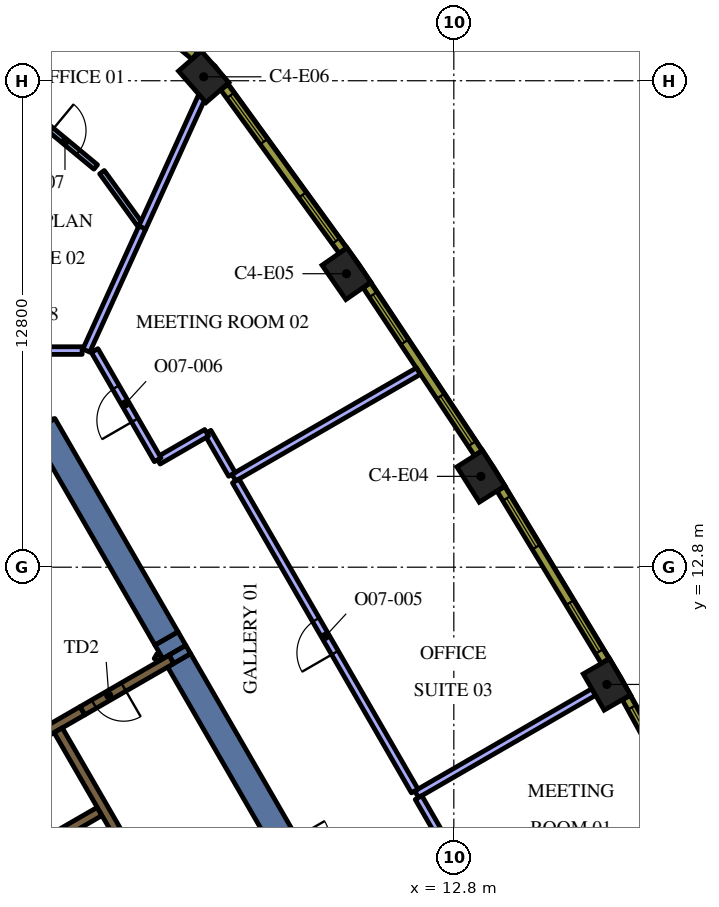
"""IFC4 building model, lengths in metres.
Left out: names, types, materials, properties, quantities, classifications, styles, units other than length and angle.
Written with IfcOpenShell. Run it as: python <this file> out.ifc"""

import sys

from ifc_helpers import new_model, si_unit, direction, frame, frame_2d, origin, origin_2d, place, context, subcontext, project, spatial, polyline, rectangle, outline, extrude, element, fill, save


model = new_model("IFC4")
c1 = context("Model", 3, precision=1e-05, world=origin(), true_north=direction((0.0, 1.0)))
c2 = subcontext(c1, "Body", "Model", "MODEL_VIEW")
j1 = project(units=[si_unit("LENGTHUNIT", "METRE"), si_unit("PLANEANGLEUNIT", "RADIAN")], contexts=[c1])
p1 = place(None, origin())
s1 = spatial("IfcSite", under=j1, at=p1, CompositionType="ELEMENT")
p2 = place(p1, origin())
s2 = spatial("IfcBuilding", under=s1, at=p2, CompositionType="ELEMENT")
p3 = place(p2, frame((0.0, 0.0, 222.6)))
s3 = spatial("IfcBuildingStorey", under=s2, at=p3, CompositionType="ELEMENT", Elevation=222.6)
for number, where, z_axis, x_axis in (
    (1, (16.827, 9.715, 0.0), (0.0, 0.0, 1.0), (-0.5, 0.866, 0.0)),
    (2, (13.513, 15.19, 0.0), (0.0, 0.0, 1.0), (-0.536, 0.845, 0.0)),
    (3, (9.975, 20.522, 0.0), (0.0, 0.0, 1.0), (-0.57, 0.822, 0.0)),
    (4, (6.219, 25.703, 0.0), (0.0, 0.0, 1.0), (-0.657, 0.754, 0.0)),
):
    element("IfcColumn", number, at=place(p3, frame(where, z_axis=z_axis, x_axis=x_axis)), inside=s3, PredefinedType="COLUMN", context=c2, shape_type="SweptSolid", body=[
        extrude(rectangle(XDim=1.1, YDim=0.8, at=origin_2d()), origin(), (0.0, 0.0, 1.0), 4.2),
    ])
p4 = place(p3, frame((5.445, 10.569, 0.0), z_axis=(0.0, 0.0, 1.0), x_axis=(-0.500218351069, 0.865899302029, 0.0)))
e5 = element("IfcWall", 5, at=p4, inside=s3, PredefinedType="SOLIDWALL", context=c2, shape_type="SweptSolid", body=[
    extrude(rectangle(XDim=0.412, YDim=0.7, at=frame_2d((0.206, 0.0))), origin(), (0.0, 0.0, 1.0), 4.2),
])
p5 = place(p3, frame((5.571, 10.35, 0.0), z_axis=(0.0, 0.0, 1.0), x_axis=(0.499968379186, -0.8660436593, 0.0)))
e6 = element("IfcWall", 6, at=p5, inside=s3, PredefinedType="SOLIDWALL", context=c2, shape_type="SweptSolid", body=[
    extrude(rectangle(XDim=5.328, YDim=0.7, at=frame_2d((2.664, 0.0))), origin(), (0.0, 0.0, 1.0), 4.2),
])
p6 = place(p3, origin())
e7 = element("IfcWall", 7, at=p6, inside=s3, PredefinedType="SOLIDWALL", context=c2, shape_type="SweptSolid", body=[
    extrude(outline(polyline([(5.432, 10.272), (5.308, 10.487), (5.749, 10.742), (5.873, 10.527), (5.432, 10.272)])), origin(), (0.0, 0.0, 1.0), 4.2),
])
p7 = place(p3, frame((5.238, 10.927, 0.0), z_axis=(0.0, 0.0, 1.0), x_axis=(-0.499985607887, 0.866033712915, 0.0)))
e8 = element("IfcWall", 8, at=p7, inside=s3, PredefinedType="SOLIDWALL", context=c2, shape_type="SweptSolid", body=[
    extrude(rectangle(XDim=6.478, YDim=0.7, at=frame_2d((3.239, 0.0))), origin(), (0.0, 0.0, 1.0), 4.2),
])
e9 = element("IfcWall", 9, at=p6, inside=s3, PredefinedType="SOLIDWALL", context=c2, shape_type="SweptSolid", body=[
    extrude(outline(polyline([(1.501, 16.7), (2.277, 16.7), (1.695, 16.364), (1.501, 16.7)])), origin(), (0.0, 0.0, 1.0), 4.2),
])
p8 = place(p3, frame((3.028, 9.023, 0.0), z_axis=(0.0, 0.0, 1.0), x_axis=(-0.866036587186, -0.49998062928, 0.0)))
e10 = element("IfcWall", 10, at=p8, inside=s3, PredefinedType="SOLIDWALL", context=c2, shape_type="SweptSolid", body=[
    extrude(rectangle(XDim=3.384, YDim=0.25, at=frame_2d((1.692, 0.0))), origin(), (0.0, 0.0, 1.0), 4.2),
])
p9 = place(p3, frame((5.97, -2.591, 0.0), z_axis=(0.0, 0.0, 1.0), x_axis=(-0.499994469932, 0.866028596547, 0.0)))
e11 = element("IfcWall", 11, at=p9, inside=s3, PredefinedType="SOLIDWALL", context=c2, shape_type="SweptSolid", body=[
    extrude(rectangle(XDim=10.488, YDim=0.25, at=frame_2d((5.244, 0.0))), origin(), (0.0, 0.0, 1.0), 4.2),
])
p10 = place(p3, frame((1.574, 5.274, 0.0), z_axis=(0.0, 0.0, 1.0), x_axis=(0.866028486751, 0.499994660107, 0.0)))
e12 = element("IfcWall", 12, at=p10, inside=s3, PredefinedType="SOLIDWALL", context=c2, shape_type="SweptSolid", body=[
    extrude(rectangle(XDim=2.2, YDim=0.25, at=frame_2d((1.1, 0.0))), origin(), (0.0, 0.0, 1.0), 4.2),
])
p11 = place(p3, frame((4.98, 10.358, 0.0), z_axis=(0.0, 0.0, 1.0), x_axis=(0.500640202437, 0.86565546709, 0.0)))
e13 = element("IfcWall", 13, at=p11, inside=s3, PredefinedType="PARTITIONING", context=c2, shape_type="SweptSolid", body=[
    extrude(rectangle(XDim=0.146, YDim=0.15, at=frame_2d((0.073, 0.0))), origin(), (0.0, 0.0, 1.0), 3.45),
])
p12 = place(p3, frame((8.565, -2.185, 0.0), z_axis=(0.0, 0.0, 1.0), x_axis=(-0.499997954832, 0.866026584559, 0.0)))
e14 = element("IfcWall", 14, at=p12, inside=s3, PredefinedType="SOLIDWALL", context=c2, shape_type="SweptSolid", body=[
    extrude(rectangle(XDim=12.35, YDim=0.25, at=frame_2d((6.175, 0.0))), origin(), (0.0, 0.0, 1.0), 4.2),
])
p13 = place(p12, frame((0.585, 0.0, 0.0)))
e15 = element("IfcOpeningElement", 15, at=p13, cuts=e14, PredefinedType="OPENING", context=c2, shape_type="SweptSolid", body=[
    extrude(rectangle(XDim=1.1, YDim=2.1, at=frame_2d((0.55, 1.05))), frame((0.0, 0.135, 0.0), z_axis=(0.0, -1.0, 0.0), x_axis=(1.0, 0.0, 0.0)), (0.0, 0.0, 1.0), 0.27),
])
p14 = place(p3, frame((5.366, 10.373, 0.0), z_axis=(0.0, 0.0, 1.0), x_axis=(-0.866019956843, -0.50000943426, 0.0)))
e16 = element("IfcWall", 16, at=p14, inside=s3, PredefinedType="SOLIDWALL", context=c2, shape_type="SweptSolid", body=[
    extrude(rectangle(XDim=2.7, YDim=0.25, at=frame_2d((1.35, 0.0))), origin(), (0.0, 0.0, 1.0), 4.2),
])
p15 = place(p14, frame((1.45, 0.0, 0.0)))
e17 = element("IfcOpeningElement", 17, at=p15, cuts=e16, PredefinedType="OPENING", context=c2, shape_type="SweptSolid", body=[
    extrude(rectangle(XDim=0.9, YDim=2.1, at=frame_2d((0.45, 1.05))), frame((0.0, 0.135, 0.0), z_axis=(0.0, -1.0, 0.0), x_axis=(1.0, 0.0, 0.0)), (0.0, 0.0, 1.0), 0.27),
])
p16 = place(p3, frame((11.821, 6.825, 0.0), z_axis=(0.0, 0.0, 1.0), x_axis=(0.866011792348, 0.500023574959, 0.0)))
e18 = element("IfcWall", 18, at=p16, inside=s3, PredefinedType="PARTITIONING", context=c2, shape_type="SweptSolid", body=[
    extrude(rectangle(XDim=5.381, YDim=0.2, at=frame_2d((2.69, 0.0))), origin(), (0.0, 0.0, 1.0), 3.45),
])
p17 = place(p3, frame((16.581, -1.419, 0.0), z_axis=(0.0, 0.0, 1.0), x_axis=(-0.500019350398, 0.866014231539, 0.0)))
e19 = element("IfcWall", 19, at=p17, inside=s3, PredefinedType="PARTITIONING", context=c2, shape_type="SweptSolid", body=[
    extrude(rectangle(XDim=9.42, YDim=0.2, at=frame_2d((4.71, 0.0))), origin(), (0.0, 0.0, 1.0), 3.45),
])
p18 = place(p17, frame((4.2, 0.0, 0.0)))
e20 = element("IfcOpeningElement", 20, at=p18, cuts=e19, PredefinedType="OPENING", context=c2, shape_type="SweptSolid", body=[
    extrude(rectangle(XDim=1.0, YDim=2.1, at=frame_2d((0.5, 1.05))), frame((0.0, 0.11, 0.0), z_axis=(0.0, -1.0, 0.0), x_axis=(1.0, 0.0, 0.0)), (0.0, 0.0, 1.0), 0.22),
])
p19 = place(p3, frame((7.011, 15.156, 0.0), z_axis=(0.0, 0.0, 1.0), x_axis=(0.866015917575, 0.500016430238, 0.0)))
e21 = element("IfcWall", 21, at=p19, inside=s3, PredefinedType="PARTITIONING", context=c2, shape_type="SweptSolid", body=[
    extrude(rectangle(XDim=5.607, YDim=0.2, at=frame_2d((2.804, 0.0))), origin(), (0.0, 0.0, 1.0), 3.45),
])
p20 = place(p3, frame((11.771, 6.912, 0.0), z_axis=(0.0, 0.0, 1.0), x_axis=(-0.500008127286, 0.866020711443, 0.0)))
e22 = element("IfcWall", 22, at=p20, inside=s3, PredefinedType="PARTITIONING", context=c2, shape_type="SweptSolid", body=[
    extrude(rectangle(XDim=9.42, YDim=0.2, at=frame_2d((4.71, 0.0))), origin(), (0.0, 0.0, 1.0), 3.45),
])
p21 = place(p20, frame((4.2, 0.0, 0.0)))
e23 = element("IfcOpeningElement", 23, at=p21, cuts=e22, PredefinedType="OPENING", context=c2, shape_type="SweptSolid", body=[
    extrude(rectangle(XDim=1.0, YDim=2.1, at=frame_2d((0.5, 1.05))), frame((0.0, 0.11, 0.0), z_axis=(0.0, -1.0, 0.0), x_axis=(1.0, 0.0, 0.0)), (0.0, 0.0, 1.0), 0.22),
])
p22 = place(p3, frame((4.599, 21.729, 0.0), z_axis=(0.0, 0.0, 1.0), x_axis=(0.414300595715, 0.91014010811, 0.0)))
e24 = element("IfcWall", 24, at=p22, inside=s3, PredefinedType="PARTITIONING", context=c2, shape_type="SweptSolid", body=[
    extrude(rectangle(XDim=3.77, YDim=0.2, at=frame_2d((1.885, 0.0))), origin(), (0.0, 0.0, 1.0), 3.45),
])
p23 = place(p3, frame((3.129, 18.5, 0.0), z_axis=(0.0, 0.0, 1.0), x_axis=(0.41435618773, 0.910114800281, 0.0)))
e25 = element("IfcWall", 25, at=p23, inside=s3, PredefinedType="PARTITIONING", context=c2, shape_type="SweptSolid", body=[
    extrude(rectangle(XDim=3.557, YDim=0.2, at=frame_2d((1.779, 0.0))), origin(), (0.0, 0.0, 1.0), 3.45),
])
p24 = place(p3, frame((6.961, 15.243, 0.0), z_axis=(0.0, 0.0, 1.0), x_axis=(-0.500036104519, 0.866004557827, 0.0)))
e26 = element("IfcWall", 26, at=p24, inside=s3, PredefinedType="PARTITIONING", context=c2, shape_type="SweptSolid", body=[
    extrude(rectangle(XDim=1.28, YDim=0.2, at=frame_2d((0.64, 0.0))), origin(), (0.0, 0.0, 1.0), 3.45),
])
p25 = place(p3, frame((6.295, 16.336, 0.0), z_axis=(0.0, 0.0, 1.0), x_axis=(-0.866088799389, -0.499890179513, 0.0)))
e27 = element("IfcWall", 27, at=p25, inside=s3, PredefinedType="PARTITIONING", context=c2, shape_type="SweptSolid", body=[
    extrude(rectangle(XDim=1.47, YDim=0.2, at=frame_2d((0.735, 0.0))), origin(), (0.0, 0.0, 1.0), 3.45),
])
p26 = place(p3, frame((5.007, 15.627, 0.0), z_axis=(0.0, 0.0, 1.0), x_axis=(-0.499962429619, 0.866047093968, 0.0)))
e28 = element("IfcWall", 28, at=p26, inside=s3, PredefinedType="PARTITIONING", context=c2, shape_type="SweptSolid", body=[
    extrude(rectangle(XDim=3.317, YDim=0.2, at=frame_2d((1.659, 0.0))), origin(), (0.0, 0.0, 1.0), 3.45),
])
p27 = place(p26, frame((1.2, 0.0, 0.0)))
e29 = element("IfcOpeningElement", 29, at=p27, cuts=e28, PredefinedType="OPENING", context=c2, shape_type="SweptSolid", body=[
    extrude(rectangle(XDim=1.0, YDim=2.1, at=frame_2d((0.5, 1.05))), frame((0.0, 0.11, 0.0), z_axis=(0.0, -1.0, 0.0), x_axis=(1.0, 0.0, 0.0)), (0.0, 0.0, 1.0), 0.22),
])
p28 = place(p3, frame((4.533, 21.826, 0.0), z_axis=(0.0, 0.0, 1.0), x_axis=(-0.587019669034, 0.809572670096, 0.0)))
e30 = element("IfcWall", 30, at=p28, inside=s3, PredefinedType="PARTITIONING", context=c2, shape_type="SweptSolid", body=[
    extrude(rectangle(XDim=1.689, YDim=0.15, at=frame_2d((0.845, 0.0))), origin(), (0.0, 0.0, 1.0), 3.45),
])
p29 = place(p3, frame((1.808, 24.631, 0.0), z_axis=(0.0, 0.0, 1.0), x_axis=(0.769986239032, -0.638060492195, 0.0)))
e31 = element("IfcWall", 31, at=p29, inside=s3, PredefinedType="PARTITIONING", context=c2, shape_type="SweptSolid", body=[
    extrude(rectangle(XDim=2.038, YDim=0.15, at=frame_2d((1.019, 0.0))), origin(), (0.0, 0.0, 1.0), 3.45),
])
p30 = place(p29, frame((0.538, 0.0, 0.0)))
e32 = element("IfcOpeningElement", 32, at=p30, cuts=e31, PredefinedType="OPENING", context=c2, shape_type="SweptSolid", body=[
    extrude(rectangle(XDim=0.9, YDim=2.1, at=frame_2d((0.45, 1.05))), frame((0.0, 0.085, 0.0), z_axis=(0.0, -1.0, 0.0), x_axis=(1.0, 0.0, 0.0)), (0.0, 0.0, 1.0), 0.17),
])
p31 = place(p3, frame((3.019, 18.5, 0.0), z_axis=(0.0, 0.0, 1.0), x_axis=(-1.0, 0.0, 0.0)))
e33 = element("IfcWall", 33, at=p31, inside=s3, PredefinedType="PARTITIONING", context=c2, shape_type="SweptSolid", body=[
    extrude(rectangle(XDim=2.919, YDim=0.2, at=frame_2d((1.459, 0.0))), origin(), (0.0, 0.0, 1.0), 3.45),
])
p32 = place(p31, frame((1.0, 0.0, 0.0)))
e34 = element("IfcOpeningElement", 34, at=p32, cuts=e33, PredefinedType="OPENING", context=c2, shape_type="SweptSolid", body=[
    extrude(rectangle(XDim=1.0, YDim=2.1, at=frame_2d((0.5, 1.05))), frame((0.0, 0.11, 0.0), z_axis=(0.0, -1.0, 0.0), x_axis=(1.0, 0.0, 0.0)), (0.0, 0.0, 1.0), 0.22),
])
p33 = place(p3, frame((19.892, 4.725, 0.0), z_axis=(0.0, 0.0, 1.0), x_axis=(-0.481925825015, 0.876212017256, 0.0)))
e35 = element("IfcWall", 35, at=p33, inside=s3, PredefinedType="SOLIDWALL", context=c2, shape_type="SweptSolid", body=[
    extrude(rectangle(XDim=5.299, YDim=0.24, at=frame_2d((2.649, 0.0))), origin(), (0.0, 0.0, 1.0), 3.95),
])
p34 = place(p33, frame((0.295, 0.0, 0.9)))
e36 = element("IfcOpeningElement", 36, at=p34, cuts=e35, PredefinedType="OPENING", context=c2, shape_type="SweptSolid", body=[
    extrude(rectangle(XDim=1.5, YDim=2.55, at=frame_2d((0.75, 1.275))), frame((0.0, 0.13, 0.0), z_axis=(0.0, -1.0, 0.0), x_axis=(1.0, 0.0, 0.0)), (0.0, 0.0, 1.0), 0.26),
])
p35 = place(p33, frame((3.504, 0.0, 0.9)))
e37 = element("IfcOpeningElement", 37, at=p35, cuts=e35, PredefinedType="OPENING", context=c2, shape_type="SweptSolid", body=[
    extrude(rectangle(XDim=1.5, YDim=2.55, at=frame_2d((0.75, 1.275))), frame((0.0, 0.13, 0.0), z_axis=(0.0, -1.0, 0.0), x_axis=(1.0, 0.0, 0.0)), (0.0, 0.0, 1.0), 0.26),
])
p36 = place(p3, frame((16.782, 10.331, 0.0), z_axis=(0.0, 0.0, 1.0), x_axis=(-0.517846166225, 0.855473756538, 0.0)))
e38 = element("IfcWall", 38, at=p36, inside=s3, PredefinedType="SOLIDWALL", context=c2, shape_type="SweptSolid", body=[
    extrude(rectangle(XDim=5.298, YDim=0.24, at=frame_2d((2.649, 0.0))), origin(), (0.0, 0.0, 1.0), 3.95),
])
p37 = place(p36, frame((0.294, 0.0, 0.9)))
e39 = element("IfcOpeningElement", 39, at=p37, cuts=e38, PredefinedType="OPENING", context=c2, shape_type="SweptSolid", body=[
    extrude(rectangle(XDim=1.5, YDim=2.55, at=frame_2d((0.75, 1.275))), frame((0.0, 0.13, 0.0), z_axis=(0.0, -1.0, 0.0), x_axis=(1.0, 0.0, 0.0)), (0.0, 0.0, 1.0), 0.26),
])
p38 = place(p36, frame((3.504, 0.0, 0.9)))
e40 = element("IfcOpeningElement", 40, at=p38, cuts=e38, PredefinedType="OPENING", context=c2, shape_type="SweptSolid", body=[
    extrude(rectangle(XDim=1.5, YDim=2.55, at=frame_2d((0.75, 1.275))), frame((0.0, 0.13, 0.0), z_axis=(0.0, -1.0, 0.0), x_axis=(1.0, 0.0, 0.0)), (0.0, 0.0, 1.0), 0.26),
])
p39 = place(p3, frame((13.442, 15.803, 0.0), z_axis=(0.0, 0.0, 1.0), x_axis=(-0.552901821755, 0.833246407433, 0.0)))
e41 = element("IfcWall", 41, at=p39, inside=s3, PredefinedType="SOLIDWALL", context=c2, shape_type="SweptSolid", body=[
    extrude(rectangle(XDim=5.298, YDim=0.24, at=frame_2d((2.649, 0.0))), origin(), (0.0, 0.0, 1.0), 3.95),
])
p40 = place(p39, frame((0.295, 0.0, 0.9)))
e42 = element("IfcOpeningElement", 42, at=p40, cuts=e41, PredefinedType="OPENING", context=c2, shape_type="SweptSolid", body=[
    extrude(rectangle(XDim=1.5, YDim=2.55, at=frame_2d((0.75, 1.275))), frame((0.0, 0.13, 0.0), z_axis=(0.0, -1.0, 0.0), x_axis=(1.0, 0.0, 0.0)), (0.0, 0.0, 1.0), 0.26),
])
p41 = place(p39, frame((3.504, 0.0, 0.9)))
e43 = element("IfcOpeningElement", 43, at=p41, cuts=e41, PredefinedType="OPENING", context=c2, shape_type="SweptSolid", body=[
    extrude(rectangle(XDim=1.5, YDim=2.55, at=frame_2d((0.75, 1.275))), frame((0.0, 0.13, 0.0), z_axis=(0.0, -1.0, 0.0), x_axis=(1.0, 0.0, 0.0)), (0.0, 0.0, 1.0), 0.26),
])
p42 = place(p3, frame((9.878, 21.132, 0.0), z_axis=(0.0, 0.0, 1.0), x_axis=(-0.586998456641, 0.80958805074, 0.0)))
e44 = element("IfcWall", 44, at=p42, inside=s3, PredefinedType="SOLIDWALL", context=c2, shape_type="SweptSolid", body=[
    extrude(rectangle(XDim=5.311, YDim=0.24, at=frame_2d((2.655, 0.0))), origin(), (0.0, 0.0, 1.0), 3.95),
])
p43 = place(p42, frame((0.306, 0.0, 0.9)))
e45 = element("IfcOpeningElement", 45, at=p43, cuts=e44, PredefinedType="OPENING", context=c2, shape_type="SweptSolid", body=[
    extrude(rectangle(XDim=1.5, YDim=2.55, at=frame_2d((0.75, 1.275))), frame((0.0, 0.13, 0.0), z_axis=(0.0, -1.0, 0.0), x_axis=(1.0, 0.0, 0.0)), (0.0, 0.0, 1.0), 0.26),
])
p44 = place(p42, frame((3.539, 0.0, 0.9)))
e46 = element("IfcOpeningElement", 46, at=p44, cuts=e44, PredefinedType="OPENING", context=c2, shape_type="SweptSolid", body=[
    extrude(rectangle(XDim=1.5, YDim=2.55, at=frame_2d((0.75, 1.275))), frame((0.0, 0.13, 0.0), z_axis=(0.0, -1.0, 0.0), x_axis=(1.0, 0.0, 0.0)), (0.0, 0.0, 1.0), 0.26),
])
p45 = place(p3, frame((5.987, 26.259, 0.0), z_axis=(0.0, 0.0, 1.0), x_axis=(-0.769990037733, 0.638055908045, 0.0)))
e47 = element("IfcWall", 47, at=p45, inside=s3, PredefinedType="SOLIDWALL", context=c2, shape_type="SweptSolid", body=[
    extrude(rectangle(XDim=2.609, YDim=0.24, at=frame_2d((1.305, 0.0))), origin(), (0.0, 0.0, 1.0), 3.95),
])
p46 = place(p45, frame((0.805, 0.0, 0.9)))
e48 = element("IfcOpeningElement", 48, at=p46, cuts=e47, PredefinedType="OPENING", context=c2, shape_type="SweptSolid", body=[
    extrude(rectangle(XDim=1.0, YDim=2.55, at=frame_2d((0.5, 1.275))), frame((0.0, 0.13, 0.0), z_axis=(0.0, -1.0, 0.0), x_axis=(1.0, 0.0, 0.0)), (0.0, 0.0, 1.0), 0.26),
])
p47 = place(p15, origin())
e49 = element("IfcDoor", 49, at=p47, inside=s3, OperationType="SINGLE_SWING_LEFT", PredefinedType="DOOR", context=c2, shape_type="SweptSolid", body=[
    extrude(rectangle(XDim=0.9, YDim=2.1, at=frame_2d((0.45, 1.05))), frame((0.0, 0.025, 0.0), z_axis=(0.0, -1.0, 0.0), x_axis=(1.0, 0.0, 0.0)), (0.0, 0.0, 1.0), 0.05),
])
fill(e17, e49)
p48 = place(p21, origin())
e50 = element("IfcDoor", 50, at=p48, inside=s3, OperationType="SINGLE_SWING_LEFT", PredefinedType="DOOR", context=c2, shape_type="SweptSolid", body=[
    extrude(rectangle(XDim=1.0, YDim=2.1, at=frame_2d((0.5, 1.05))), frame((0.0, 0.025, 0.0), z_axis=(0.0, -1.0, 0.0), x_axis=(1.0, 0.0, 0.0)), (0.0, 0.0, 1.0), 0.05),
])
fill(e23, e50)
p49 = place(p27, origin())
e51 = element("IfcDoor", 51, at=p49, inside=s3, OperationType="SINGLE_SWING_RIGHT", PredefinedType="DOOR", context=c2, shape_type="SweptSolid", body=[
    extrude(rectangle(XDim=1.0, YDim=2.1, at=frame_2d((0.5, 1.05))), frame((0.0, 0.025, 0.0), z_axis=(0.0, -1.0, 0.0), x_axis=(1.0, 0.0, 0.0)), (0.0, 0.0, 1.0), 0.05),
])
fill(e29, e51)
p50 = place(p30, origin())
e52 = element("IfcDoor", 52, at=p50, inside=s3, OperationType="SINGLE_SWING_LEFT", PredefinedType="DOOR", context=c2, shape_type="SweptSolid", body=[
    extrude(rectangle(XDim=0.9, YDim=2.1, at=frame_2d((0.45, 1.05))), frame((0.0, 0.025, 0.0), z_axis=(0.0, -1.0, 0.0), x_axis=(1.0, 0.0, 0.0)), (0.0, 0.0, 1.0), 0.05),
])
fill(e32, e52)
p51 = place(p35, origin())
e53 = element("IfcWindow", 53, at=p51, inside=s3, PartitioningType="SINGLE_PANEL", PredefinedType="WINDOW", context=c2, shape_type="SweptSolid", body=[
    extrude(rectangle(XDim=1.5, YDim=2.55, at=frame_2d((0.75, 1.275))), frame((0.0, 0.04, 0.0), z_axis=(0.0, -1.0, 0.0), x_axis=(1.0, 0.0, 0.0)), (0.0, 0.0, 1.0), 0.06),
])
fill(e37, e53)
p52 = place(p37, origin())
e54 = element("IfcWindow", 54, at=p52, inside=s3, PartitioningType="SINGLE_PANEL", PredefinedType="WINDOW", context=c2, shape_type="SweptSolid", body=[
    extrude(rectangle(XDim=1.5, YDim=2.55, at=frame_2d((0.75, 1.275))), frame((0.0, 0.04, 0.0), z_axis=(0.0, -1.0, 0.0), x_axis=(1.0, 0.0, 0.0)), (0.0, 0.0, 1.0), 0.06),
])
fill(e39, e54)
p53 = place(p38, origin())
e55 = element("IfcWindow", 55, at=p53, inside=s3, PartitioningType="SINGLE_PANEL", PredefinedType="WINDOW", context=c2, shape_type="SweptSolid", body=[
    extrude(rectangle(XDim=1.5, YDim=2.55, at=frame_2d((0.75, 1.275))), frame((0.0, 0.04, 0.0), z_axis=(0.0, -1.0, 0.0), x_axis=(1.0, 0.0, 0.0)), (0.0, 0.0, 1.0), 0.06),
])
fill(e40, e55)
p54 = place(p40, origin())
e56 = element("IfcWindow", 56, at=p54, inside=s3, PartitioningType="SINGLE_PANEL", PredefinedType="WINDOW", context=c2, shape_type="SweptSolid", body=[
    extrude(rectangle(XDim=1.5, YDim=2.55, at=frame_2d((0.75, 1.275))), frame((0.0, 0.04, 0.0), z_axis=(0.0, -1.0, 0.0), x_axis=(1.0, 0.0, 0.0)), (0.0, 0.0, 1.0), 0.06),
])
fill(e42, e56)
p55 = place(p41, origin())
e57 = element("IfcWindow", 57, at=p55, inside=s3, PartitioningType="SINGLE_PANEL", PredefinedType="WINDOW", context=c2, shape_type="SweptSolid", body=[
    extrude(rectangle(XDim=1.5, YDim=2.55, at=frame_2d((0.75, 1.275))), frame((0.0, 0.04, 0.0), z_axis=(0.0, -1.0, 0.0), x_axis=(1.0, 0.0, 0.0)), (0.0, 0.0, 1.0), 0.06),
])
fill(e43, e57)
p56 = place(p43, origin())
e58 = element("IfcWindow", 58, at=p56, inside=s3, PartitioningType="SINGLE_PANEL", PredefinedType="WINDOW", context=c2, shape_type="SweptSolid", body=[
    extrude(rectangle(XDim=1.5, YDim=2.55, at=frame_2d((0.75, 1.275))), frame((0.0, 0.04, 0.0), z_axis=(0.0, -1.0, 0.0), x_axis=(1.0, 0.0, 0.0)), (0.0, 0.0, 1.0), 0.06),
])
fill(e45, e58)
p57 = place(p44, origin())
e59 = element("IfcWindow", 59, at=p57, inside=s3, PartitioningType="SINGLE_PANEL", PredefinedType="WINDOW", context=c2, shape_type="SweptSolid", body=[
    extrude(rectangle(XDim=1.5, YDim=2.55, at=frame_2d((0.75, 1.275))), frame((0.0, 0.04, 0.0), z_axis=(0.0, -1.0, 0.0), x_axis=(1.0, 0.0, 0.0)), (0.0, 0.0, 1.0), 0.06),
])
fill(e46, e59)
save(model, sys.argv[1])
